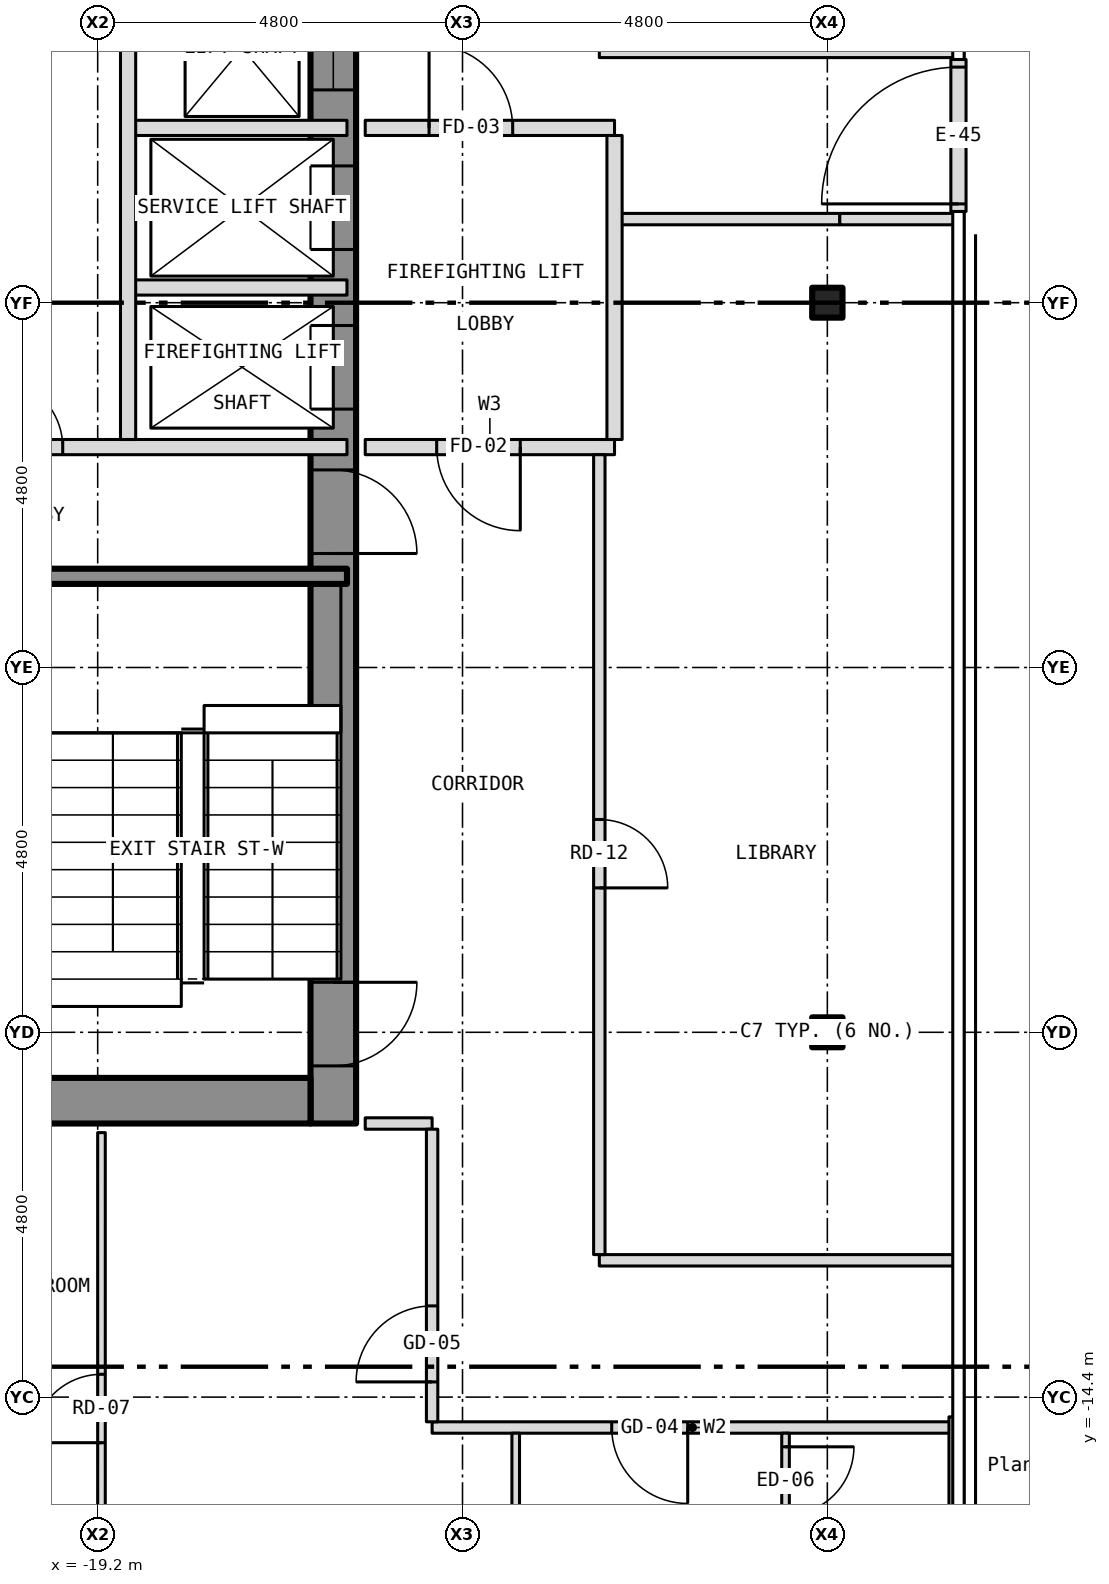
"""IFC4 building model, lengths in metres.
Left out: names, types, materials, properties, quantities, classifications, styles, units other than length and angle.
Written with IfcOpenShell. Run it as: python <this file> out.ifc"""

import sys

from ifc_helpers import new_model, si_unit, direction, frame, frame_2d, origin, origin_2d, place, context, subcontext, project, spatial, rectangle, i_section, extrude, element, fill, save


model = new_model("IFC4")
c1 = context("Model", 3, precision=1e-05, world=origin(), true_north=direction((0.0, 1.0)))
c2 = subcontext(c1, "Body", "Model", "MODEL_VIEW")
j1 = project(units=[si_unit("LENGTHUNIT", "METRE"), si_unit("PLANEANGLEUNIT", "RADIAN")], contexts=[c1])
p1 = place(None, origin())
s1 = spatial("IfcSite", under=j1, at=p1, CompositionType="ELEMENT")
p2 = place(p1, origin())
s2 = spatial("IfcBuilding", under=s1, at=p2, CompositionType="ELEMENT")
p3 = place(p2, frame((0.0, 0.0, 117.0)))
s3 = spatial("IfcBuildingStorey", under=s2, at=p3, CompositionType="ELEMENT", Elevation=117.0)
for number, where, z_axis, x_axis in (
    (1, (-9.6, -9.6, -0.15), (0.0, 0.0, 1.0), (1.0, 0.0, 0.0)),
    (2, (-9.6, 0.0, -0.15), (0.0, 0.0, 1.0), (1.0, 0.0, 0.0)),
):
    element("IfcColumn", number, at=place(p3, frame(where, z_axis=z_axis, x_axis=x_axis)), inside=s3, PredefinedType="COLUMN", context=c2, shape_type="SweptSolid", body=[
        extrude(i_section(OverallWidth=0.399, OverallDepth=0.394, WebThickness=0.023, FlangeThickness=0.037, at=origin_2d()), origin(), (0.0, 0.0, 1.0), 3.5),
    ])
p4 = place(p3, frame((-16.1, -10.8, 0.0), z_axis=(0.0, 0.0, 1.0), x_axis=(0.0, 1.0, 0.0)))
e3 = element("IfcWall", 3, at=p4, inside=s3, PredefinedType="SHEAR", context=c2, shape_type="SweptSolid", body=[
    extrude(rectangle(XDim=21.6, YDim=0.6, at=frame_2d((10.8, 0.0))), origin(), (0.0, 0.0, 1.0), 3.25),
])
p5 = place(p4, frame((9.4, 0.0, 0.0)))
e4 = element("IfcOpeningElement", 4, at=p5, cuts=e3, PredefinedType="OPENING", context=c2, shape_type="SweptSolid", body=[
    extrude(rectangle(XDim=1.1, YDim=2.1, at=frame_2d((0.55, 1.05))), frame((0.0, 0.312, 0.0), z_axis=(0.0, -1.0, 0.0), x_axis=(1.0, 0.0, 0.0)), (0.0, 0.0, 1.0), 0.624),
])
p6 = place(p4, frame((11.5, 0.0, 0.0)))
e5 = element("IfcOpeningElement", 5, at=p6, cuts=e3, PredefinedType="OPENING", context=c2, shape_type="SweptSolid", body=[
    extrude(rectangle(XDim=1.1, YDim=2.1, at=frame_2d((0.55, 1.05))), frame((0.0, 0.312, 0.0), z_axis=(0.0, -1.0, 0.0), x_axis=(1.0, 0.0, 0.0)), (0.0, 0.0, 1.0), 0.624),
])
p7 = place(p4, frame((13.6, 0.0, 0.0)))
e6 = element("IfcOpeningElement", 6, at=p7, cuts=e3, PredefinedType="OPENING", context=c2, shape_type="SweptSolid", body=[
    extrude(rectangle(XDim=1.1, YDim=2.1, at=frame_2d((0.55, 1.05))), frame((0.0, 0.312, 0.0), z_axis=(0.0, -1.0, 0.0), x_axis=(1.0, 0.0, 0.0)), (0.0, 0.0, 1.0), 0.624),
])
p8 = place(p4, frame((15.7, 0.0, 0.0)))
e7 = element("IfcOpeningElement", 7, at=p8, cuts=e3, PredefinedType="OPENING", context=c2, shape_type="SweptSolid", body=[
    extrude(rectangle(XDim=1.1, YDim=2.1, at=frame_2d((0.55, 1.05))), frame((0.0, 0.312, 0.0), z_axis=(0.0, -1.0, 0.0), x_axis=(1.0, 0.0, 0.0)), (0.0, 0.0, 1.0), 0.624),
])
p9 = place(p4, frame((17.8, 0.0, 0.0)))
e8 = element("IfcOpeningElement", 8, at=p9, cuts=e3, PredefinedType="OPENING", context=c2, shape_type="SweptSolid", body=[
    extrude(rectangle(XDim=1.1, YDim=2.1, at=frame_2d((0.55, 1.05))), frame((0.0, 0.312, 0.0), z_axis=(0.0, -1.0, 0.0), x_axis=(1.0, 0.0, 0.0)), (0.0, 0.0, 1.0), 0.624),
])
p10 = place(p4, frame((0.758, 0.0, 0.0)))
e9 = element("IfcOpeningElement", 9, at=p10, cuts=e3, PredefinedType="OPENING", context=c2, shape_type="SweptSolid", body=[
    extrude(rectangle(XDim=1.1, YDim=2.1, at=frame_2d((0.55, 1.05))), frame((0.0, 0.312, 0.0), z_axis=(0.0, -1.0, 0.0), x_axis=(1.0, 0.0, 0.0)), (0.0, 0.0, 1.0), 0.624),
])
p11 = place(p4, frame((7.5, 0.0, 0.0)))
e10 = element("IfcOpeningElement", 10, at=p11, cuts=e3, PredefinedType="OPENING", context=c2, shape_type="SweptSolid", body=[
    extrude(rectangle(XDim=1.1, YDim=2.1, at=frame_2d((0.55, 1.05))), frame((0.0, 0.312, 0.0), z_axis=(0.0, -1.0, 0.0), x_axis=(1.0, 0.0, 0.0)), (0.0, 0.0, 1.0), 0.624),
])
p12 = place(p3, frame((-22.2, -10.5, 0.0), z_axis=(0.0, 0.0, 1.0), x_axis=(1.0, 0.0, 0.0)))
e11 = element("IfcWall", 11, at=p12, inside=s3, PredefinedType="SHEAR", context=c2, shape_type="SweptSolid", body=[
    extrude(rectangle(XDim=5.8, YDim=0.6, at=frame_2d((2.9, 0.0))), origin(), (0.0, 0.0, 1.0), 3.25),
])
p13 = place(p3, frame((-7.875, 1.2, 0.0), z_axis=(0.0, 0.0, 1.0), x_axis=(0.0, 1.0, 0.0)))
e12 = element("IfcWall", 12, at=p13, inside=s3, PredefinedType="SOLIDWALL", context=c2, shape_type="SweptSolid", body=[
    extrude(rectangle(XDim=2.0, YDim=0.2, at=frame_2d((1.0, 0.0))), origin(), (0.0, 0.0, 1.0), 2.593),
])
p14 = place(p13, frame((0.1, 0.0, 0.0)))
e13 = element("IfcOpeningElement", 13, at=p14, cuts=e12, PredefinedType="OPENING", context=c2, shape_type="SweptSolid", body=[
    extrude(rectangle(XDim=1.8, YDim=2.1, at=frame_2d((0.9, 1.05))), frame((0.0, 0.112, 0.0), z_axis=(0.0, -1.0, 0.0), x_axis=(1.0, 0.0, 0.0)), (0.0, 0.0, 1.0), 0.224),
])
p15 = place(p3, frame((-14.8, -14.8, 0.0), z_axis=(0.0, 0.0, 1.0), x_axis=(1.0, 0.0, 0.0)))
e14 = element("IfcWall", 14, at=p15, inside=s3, PredefinedType="PARTITIONING", context=c2, shape_type="SweptSolid", body=[
    extrude(rectangle(XDim=6.85, YDim=0.15, at=frame_2d((3.425, 0.0))), origin(), (0.0, 0.0, 1.0), 3.35),
])
p16 = place(p15, frame((2.363, 0.0, 0.0)))
e15 = element("IfcOpeningElement", 15, at=p16, cuts=e14, PredefinedType="OPENING", context=c2, shape_type="SweptSolid", body=[
    extrude(rectangle(XDim=1.0, YDim=2.1, at=frame_2d((0.5, 1.05))), frame((0.0, 0.087, 0.0), z_axis=(0.0, -1.0, 0.0), x_axis=(1.0, 0.0, 0.0)), (0.0, 0.0, 1.0), 0.174),
])
p17 = place(p3, frame((-12.6, -12.6, 0.0), z_axis=(0.0, 0.0, 1.0), x_axis=(1.0, 0.0, 0.0)))
e16 = element("IfcWall", 16, at=p17, inside=s3, PredefinedType="PARTITIONING", context=c2, shape_type="SweptSolid", body=[
    extrude(rectangle(XDim=4.68, YDim=0.15, at=frame_2d((2.34, 0.0))), origin(), (0.0, 0.0, 1.0), 3.35),
])
p18 = place(p3, frame((-15.68, -10.8, 0.0), z_axis=(0.0, 0.0, 1.0), x_axis=(1.0, 0.0, 0.0)))
e17 = element("IfcWall", 17, at=p18, inside=s3, PredefinedType="PARTITIONING", context=c2, shape_type="SweptSolid", body=[
    extrude(rectangle(XDim=0.88, YDim=0.15, at=frame_2d((0.44, 0.0))), origin(), (0.0, 0.0, 1.0), 3.35),
])
p19 = place(p3, frame((-20.0, -3.6, 0.0), z_axis=(0.0, 0.0, 1.0), x_axis=(1.0, 0.0, 0.0)))
e18 = element("IfcWall", 18, at=p19, inside=s3, PredefinedType="SHEAR", context=c2, shape_type="SweptSolid", body=[
    extrude(rectangle(XDim=4.08, YDim=0.2, at=frame_2d((2.04, 0.0))), origin(), (0.0, 0.0, 1.0), 3.25),
])
p20 = place(p3, frame((-22.68, -1.9, 0.0), z_axis=(0.0, 0.0, 1.0), x_axis=(1.0, 0.0, 0.0)))
e19 = element("IfcWall", 19, at=p20, inside=s3, PredefinedType="PARTITIONING", context=c2, shape_type="SweptSolid", body=[
    extrude(rectangle(XDim=6.76, YDim=0.2, at=frame_2d((3.38, 0.0))), origin(), (0.0, 0.0, 1.0), 3.25),
])
p21 = place(p20, frame((2.12, 0.0, 0.0)))
e20 = element("IfcOpeningElement", 20, at=p21, cuts=e19, PredefinedType="OPENING", context=c2, shape_type="SweptSolid", body=[
    extrude(rectangle(XDim=0.9, YDim=2.1, at=frame_2d((0.45, 1.05))), frame((0.0, 0.112, 0.0), z_axis=(0.0, -1.0, 0.0), x_axis=(1.0, 0.0, 0.0)), (0.0, 0.0, 1.0), 0.224),
])
p22 = place(p3, frame((-15.68, -1.9, 0.0), z_axis=(0.0, 0.0, 1.0), x_axis=(1.0, 0.0, 0.0)))
e21 = element("IfcWall", 21, at=p22, inside=s3, PredefinedType="PARTITIONING", context=c2, shape_type="SweptSolid", body=[
    extrude(rectangle(XDim=3.28, YDim=0.2, at=frame_2d((1.64, 0.0))), origin(), (0.0, 0.0, 1.0), 3.35),
])
p23 = place(p22, frame((0.94, 0.0, 0.0)))
e22 = element("IfcOpeningElement", 22, at=p23, cuts=e21, PredefinedType="OPENING", context=c2, shape_type="SweptSolid", body=[
    extrude(rectangle(XDim=1.1, YDim=2.1, at=frame_2d((0.55, 1.05))), frame((0.0, 0.112, 0.0), z_axis=(0.0, -1.0, 0.0), x_axis=(1.0, 0.0, 0.0)), (0.0, 0.0, 1.0), 0.224),
])
p24 = place(p3, frame((-18.8, 0.2, 0.0), z_axis=(0.0, 0.0, 1.0), x_axis=(1.0, 0.0, 0.0)))
e23 = element("IfcWall", 23, at=p24, inside=s3, PredefinedType="PARTITIONING", context=c2, shape_type="SweptSolid", body=[
    extrude(rectangle(XDim=2.88, YDim=0.2, at=frame_2d((1.44, 0.0))), origin(), (0.0, 0.0, 1.0), 3.25),
])
p25 = place(p3, frame((-12.4, 1.1, 0.0), z_axis=(0.0, 0.0, 1.0), x_axis=(1.0, 0.0, 0.0)))
e24 = element("IfcWall", 24, at=p25, inside=s3, PredefinedType="PARTITIONING", context=c2, shape_type="SweptSolid", body=[
    extrude(rectangle(XDim=2.964, YDim=0.15, at=frame_2d((1.482, 0.0))), origin(), (0.0, 0.0, 1.0), 3.35),
])
p26 = place(p3, frame((-9.436, 1.1, 0.0), z_axis=(0.0, 0.0, 1.0), x_axis=(1.0, 0.0, 0.0)))
e25 = element("IfcWall", 25, at=p26, inside=s3, PredefinedType="PARTITIONING", context=c2, shape_type="SweptSolid", body=[
    extrude(rectangle(XDim=1.516, YDim=0.15, at=frame_2d((0.758, 0.0))), origin(), (0.0, 0.0, 1.0), 2.593),
])
p27 = place(p3, frame((-18.8, 2.3, 0.0), z_axis=(0.0, 0.0, 1.0), x_axis=(1.0, 0.0, 0.0)))
e26 = element("IfcWall", 26, at=p27, inside=s3, PredefinedType="PARTITIONING", context=c2, shape_type="SweptSolid", body=[
    extrude(rectangle(XDim=2.88, YDim=0.2, at=frame_2d((1.44, 0.0))), origin(), (0.0, 0.0, 1.0), 3.25),
])
p28 = place(p3, frame((-15.68, 2.3, 0.0), z_axis=(0.0, 0.0, 1.0), x_axis=(1.0, 0.0, 0.0)))
e27 = element("IfcWall", 27, at=p28, inside=s3, PredefinedType="PARTITIONING", context=c2, shape_type="SweptSolid", body=[
    extrude(rectangle(XDim=3.28, YDim=0.2, at=frame_2d((1.64, 0.0))), origin(), (0.0, 0.0, 1.0), 3.35),
])
p29 = place(p28, frame((0.84, 0.0, 0.0)))
e28 = element("IfcOpeningElement", 28, at=p29, cuts=e27, PredefinedType="OPENING", context=c2, shape_type="SweptSolid", body=[
    extrude(rectangle(XDim=1.1, YDim=2.1, at=frame_2d((0.55, 1.05))), frame((0.0, 0.112, 0.0), z_axis=(0.0, -1.0, 0.0), x_axis=(1.0, 0.0, 0.0)), (0.0, 0.0, 1.0), 0.224),
])
p30 = place(p3, frame((-12.6, 3.3, 0.0), z_axis=(0.0, 0.0, 1.0), x_axis=(1.0, 0.0, 0.0)))
e29 = element("IfcWall", 29, at=p30, inside=s3, PredefinedType="PARTITIONING", context=c2, shape_type="SweptSolid", body=[
    extrude(rectangle(XDim=4.68, YDim=0.15, at=frame_2d((2.34, 0.0))), origin(), (0.0, 0.0, 1.0), 3.35),
])
p31 = place(p3, frame((-19.15, -18.78, 0.0), z_axis=(0.0, 0.0, 1.0), x_axis=(0.0, 1.0, 0.0)))
e30 = element("IfcWall", 30, at=p31, inside=s3, PredefinedType="PARTITIONING", context=c2, shape_type="SweptSolid", body=[
    extrude(rectangle(XDim=7.86, YDim=0.1, at=frame_2d((3.93, 0.0))), origin(), (0.0, 0.0, 1.0), 2.817),
])
p32 = place(p31, frame((3.78, 0.0, 0.0)))
e31 = element("IfcOpeningElement", 31, at=p32, cuts=e30, PredefinedType="OPENING", context=c2, shape_type="SweptSolid", body=[
    extrude(rectangle(XDim=0.9, YDim=2.1, at=frame_2d((0.45, 1.05))), frame((0.0, 0.062, 0.0), z_axis=(0.0, -1.0, 0.0), x_axis=(1.0, 0.0, 0.0)), (0.0, 0.0, 1.0), 0.124),
])
p33 = place(p3, frame((-18.8, -1.8, 0.0), z_axis=(0.0, 0.0, 1.0), x_axis=(0.0, 1.0, 0.0)))
e32 = element("IfcWall", 32, at=p33, inside=s3, PredefinedType="PARTITIONING", context=c2, shape_type="SweptSolid", body=[
    extrude(rectangle(XDim=12.48, YDim=0.2, at=frame_2d((6.24, 0.0))), origin(), (0.0, 0.0, 1.0), 3.25),
])
p34 = place(p3, frame((-14.8, -14.725, 0.0), z_axis=(0.0, 0.0, 1.0), x_axis=(0.0, 1.0, 0.0)))
e33 = element("IfcWall", 33, at=p34, inside=s3, PredefinedType="PARTITIONING", context=c2, shape_type="SweptSolid", body=[
    extrude(rectangle(XDim=3.85, YDim=0.15, at=frame_2d((1.925, 0.0))), origin(), (0.0, 0.0, 1.0), 3.35),
])
p35 = place(p34, frame((0.525, 0.0, 0.0)))
e34 = element("IfcOpeningElement", 34, at=p35, cuts=e33, PredefinedType="OPENING", context=c2, shape_type="SweptSolid", body=[
    extrude(rectangle(XDim=1.0, YDim=2.1, at=frame_2d((0.5, 1.05))), frame((0.0, 0.087, 0.0), z_axis=(0.0, -1.0, 0.0), x_axis=(1.0, 0.0, 0.0)), (0.0, 0.0, 1.0), 0.174),
])
p36 = place(p3, frame((-13.7, -22.68, 0.0), z_axis=(0.0, 0.0, 1.0), x_axis=(0.0, 1.0, 0.0)))
e35 = element("IfcWall", 35, at=p36, inside=s3, PredefinedType="PARTITIONING", context=c2, shape_type="SweptSolid", body=[
    extrude(rectangle(XDim=7.805, YDim=0.1, at=frame_2d((3.902, 0.0))), origin(), (0.0, 0.0, 1.0), 3.35),
])
p37 = place(p3, frame((-12.6, -12.525, 0.0), z_axis=(0.0, 0.0, 1.0), x_axis=(0.0, 1.0, 0.0)))
e36 = element("IfcWall", 36, at=p37, inside=s3, PredefinedType="PARTITIONING", context=c2, shape_type="SweptSolid", body=[
    extrude(rectangle(XDim=10.525, YDim=0.15, at=frame_2d((5.262, 0.0))), origin(), (0.0, 0.0, 1.0), 3.35),
])
p38 = place(p37, frame((4.825, 0.0, 0.0)))
e37 = element("IfcOpeningElement", 37, at=p38, cuts=e36, PredefinedType="OPENING", context=c2, shape_type="SweptSolid", body=[
    extrude(rectangle(XDim=0.9, YDim=2.1, at=frame_2d((0.45, 1.05))), frame((0.0, 0.087, 0.0), z_axis=(0.0, -1.0, 0.0), x_axis=(1.0, 0.0, 0.0)), (0.0, 0.0, 1.0), 0.174),
])
p39 = place(p3, frame((-12.4, -1.8, 0.0), z_axis=(0.0, 0.0, 1.0), x_axis=(0.0, 1.0, 0.0)))
e38 = element("IfcWall", 38, at=p39, inside=s3, PredefinedType="PARTITIONING", context=c2, shape_type="SweptSolid", body=[
    extrude(rectangle(XDim=4.0, YDim=0.2, at=frame_2d((2.0, 0.0))), origin(), (0.0, 0.0, 1.0), 3.35),
])
p40 = place(p3, frame((-10.15, -17.95, 0.0), z_axis=(0.0, 0.0, 1.0), x_axis=(0.0, 1.0, 0.0)))
e39 = element("IfcWall", 39, at=p40, inside=s3, PredefinedType="PARTITIONING", context=c2, shape_type="SweptSolid", body=[
    extrude(rectangle(XDim=3.075, YDim=0.1, at=frame_2d((1.538, 0.0))), origin(), (0.0, 0.0, 1.0), 3.35),
])
p41 = place(p40, frame((1.996, 0.0, 0.0)))
e40 = element("IfcOpeningElement", 40, at=p41, cuts=e39, PredefinedType="OPENING", context=c2, shape_type="SweptSolid", body=[
    extrude(rectangle(XDim=0.9, YDim=2.1, at=frame_2d((0.45, 1.05))), frame((0.0, 0.062, 0.0), z_axis=(0.0, -1.0, 0.0), x_axis=(1.0, 0.0, 0.0)), (0.0, 0.0, 1.0), 0.124),
])
p42 = place(p3, frame((-7.95, -18.14, 0.0), z_axis=(0.0, 0.0, 1.0), x_axis=(0.0, 1.0, 0.0)))
e41 = element("IfcWall", 41, at=p42, inside=s3, PredefinedType="PARTITIONING", context=c2, shape_type="SweptSolid", body=[
    extrude(rectangle(XDim=3.48, YDim=0.1, at=frame_2d((1.74, 0.0))), origin(), (0.0, 0.0, 1.0), 2.733),
])
p43 = place(p14, origin())
e42 = element("IfcDoor", 42, at=p43, inside=s3, OperationType="DOUBLE_DOOR_DOUBLE_SWING", PredefinedType="DOOR", context=c2, shape_type="SweptSolid", body=[
    extrude(rectangle(XDim=1.8, YDim=2.1, at=frame_2d((0.9, 1.05))), frame((0.0, 0.025, 0.0), z_axis=(0.0, -1.0, 0.0), x_axis=(1.0, 0.0, 0.0)), (0.0, 0.0, 1.0), 0.05),
])
fill(e13, e42)
p44 = place(p5, origin())
e43 = element("IfcDoor", 43, at=p44, inside=s3, OperationType="SLIDING_TO_LEFT", PredefinedType="DOOR", context=c2, shape_type="SweptSolid", body=[
    extrude(rectangle(XDim=1.1, YDim=2.1, at=frame_2d((0.55, 1.05))), frame((0.0, 0.025, 0.0), z_axis=(0.0, -1.0, 0.0), x_axis=(1.0, 0.0, 0.0)), (0.0, 0.0, 1.0), 0.05),
])
fill(e4, e43)
p45 = place(p6, origin())
e44 = element("IfcDoor", 44, at=p45, inside=s3, OperationType="SLIDING_TO_LEFT", PredefinedType="DOOR", context=c2, shape_type="SweptSolid", body=[
    extrude(rectangle(XDim=1.1, YDim=2.1, at=frame_2d((0.55, 1.05))), frame((0.0, 0.025, 0.0), z_axis=(0.0, -1.0, 0.0), x_axis=(1.0, 0.0, 0.0)), (0.0, 0.0, 1.0), 0.05),
])
fill(e5, e44)
p46 = place(p7, origin())
e45 = element("IfcDoor", 45, at=p46, inside=s3, OperationType="SLIDING_TO_LEFT", PredefinedType="DOOR", context=c2, shape_type="SweptSolid", body=[
    extrude(rectangle(XDim=1.1, YDim=2.1, at=frame_2d((0.55, 1.05))), frame((0.0, 0.025, 0.0), z_axis=(0.0, -1.0, 0.0), x_axis=(1.0, 0.0, 0.0)), (0.0, 0.0, 1.0), 0.05),
])
fill(e6, e45)
p47 = place(p10, origin())
e46 = element("IfcDoor", 46, at=p47, inside=s3, OperationType="SINGLE_SWING_RIGHT", PredefinedType="DOOR", context=c2, shape_type="SweptSolid", body=[
    extrude(rectangle(XDim=1.1, YDim=2.1, at=frame_2d((0.55, 1.05))), frame((0.0, 0.025, 0.0), z_axis=(0.0, -1.0, 0.0), x_axis=(1.0, 0.0, 0.0)), (0.0, 0.0, 1.0), 0.05),
])
fill(e9, e46)
p48 = place(p11, origin())
e47 = element("IfcDoor", 47, at=p48, inside=s3, OperationType="SINGLE_SWING_LEFT", PredefinedType="DOOR", context=c2, shape_type="SweptSolid", body=[
    extrude(rectangle(XDim=1.1, YDim=2.1, at=frame_2d((0.55, 1.05))), frame((0.0, 0.025, 0.0), z_axis=(0.0, -1.0, 0.0), x_axis=(1.0, 0.0, 0.0)), (0.0, 0.0, 1.0), 0.05),
])
fill(e10, e47)
p49 = place(p21, origin())
e48 = element("IfcDoor", 48, at=p49, inside=s3, OperationType="SINGLE_SWING_LEFT", PredefinedType="DOOR", context=c2, shape_type="SweptSolid", body=[
    extrude(rectangle(XDim=0.9, YDim=2.1, at=frame_2d((0.45, 1.05))), frame((0.0, 0.025, 0.0), z_axis=(0.0, -1.0, 0.0), x_axis=(1.0, 0.0, 0.0)), (0.0, 0.0, 1.0), 0.05),
])
fill(e20, e48)
p50 = place(p23, origin())
e49 = element("IfcDoor", 49, at=p50, inside=s3, OperationType="SINGLE_SWING_RIGHT", PredefinedType="DOOR", context=c2, shape_type="SweptSolid", body=[
    extrude(rectangle(XDim=1.1, YDim=2.1, at=frame_2d((0.55, 1.05))), frame((0.0, 0.025, 0.0), z_axis=(0.0, -1.0, 0.0), x_axis=(1.0, 0.0, 0.0)), (0.0, 0.0, 1.0), 0.05),
])
fill(e22, e49)
p51 = place(p29, origin())
e50 = element("IfcDoor", 50, at=p51, inside=s3, OperationType="SINGLE_SWING_LEFT", PredefinedType="DOOR", context=c2, shape_type="SweptSolid", body=[
    extrude(rectangle(XDim=1.1, YDim=2.1, at=frame_2d((0.55, 1.05))), frame((0.0, 0.025, 0.0), z_axis=(0.0, -1.0, 0.0), x_axis=(1.0, 0.0, 0.0)), (0.0, 0.0, 1.0), 0.05),
])
fill(e28, e50)
p52 = place(p16, origin())
e51 = element("IfcDoor", 51, at=p52, inside=s3, OperationType="SINGLE_SWING_RIGHT", PredefinedType="DOOR", context=c2, shape_type="SweptSolid", body=[
    extrude(rectangle(XDim=1.0, YDim=2.1, at=frame_2d((0.5, 1.05))), frame((0.0, 0.025, 0.0), z_axis=(0.0, -1.0, 0.0), x_axis=(1.0, 0.0, 0.0)), (0.0, 0.0, 1.0), 0.05),
])
fill(e15, e51)
p53 = place(p41, origin())
e52 = element("IfcDoor", 52, at=p53, inside=s3, OperationType="SINGLE_SWING_RIGHT", PredefinedType="DOOR", context=c2, shape_type="SweptSolid", body=[
    extrude(rectangle(XDim=0.9, YDim=2.1, at=frame_2d((0.45, 1.05))), frame((0.0, 0.025, 0.0), z_axis=(0.0, -1.0, 0.0), x_axis=(1.0, 0.0, 0.0)), (0.0, 0.0, 1.0), 0.05),
])
fill(e40, e52)
p54 = place(p35, origin())
e53 = element("IfcDoor", 53, at=p54, inside=s3, OperationType="SINGLE_SWING_LEFT", PredefinedType="DOOR", context=c2, shape_type="SweptSolid", body=[
    extrude(rectangle(XDim=1.0, YDim=2.1, at=frame_2d((0.5, 1.05))), frame((0.0, 0.025, 0.0), z_axis=(0.0, -1.0, 0.0), x_axis=(1.0, 0.0, 0.0)), (0.0, 0.0, 1.0), 0.05),
])
fill(e34, e53)
p55 = place(p32, origin())
e54 = element("IfcDoor", 54, at=p55, inside=s3, OperationType="SINGLE_SWING_LEFT", PredefinedType="DOOR", context=c2, shape_type="SweptSolid", body=[
    extrude(rectangle(XDim=0.9, YDim=2.1, at=frame_2d((0.45, 1.05))), frame((0.0, 0.025, 0.0), z_axis=(0.0, -1.0, 0.0), x_axis=(1.0, 0.0, 0.0)), (0.0, 0.0, 1.0), 0.05),
])
fill(e31, e54)
p56 = place(p38, origin())
e55 = element("IfcDoor", 55, at=p56, inside=s3, OperationType="SINGLE_SWING_LEFT", PredefinedType="DOOR", context=c2, shape_type="SweptSolid", body=[
    extrude(rectangle(XDim=0.9, YDim=2.1, at=frame_2d((0.45, 1.05))), frame((0.0, 0.025, 0.0), z_axis=(0.0, -1.0, 0.0), x_axis=(1.0, 0.0, 0.0)), (0.0, 0.0, 1.0), 0.05),
])
fill(e37, e55)
save(model, sys.argv[1])
